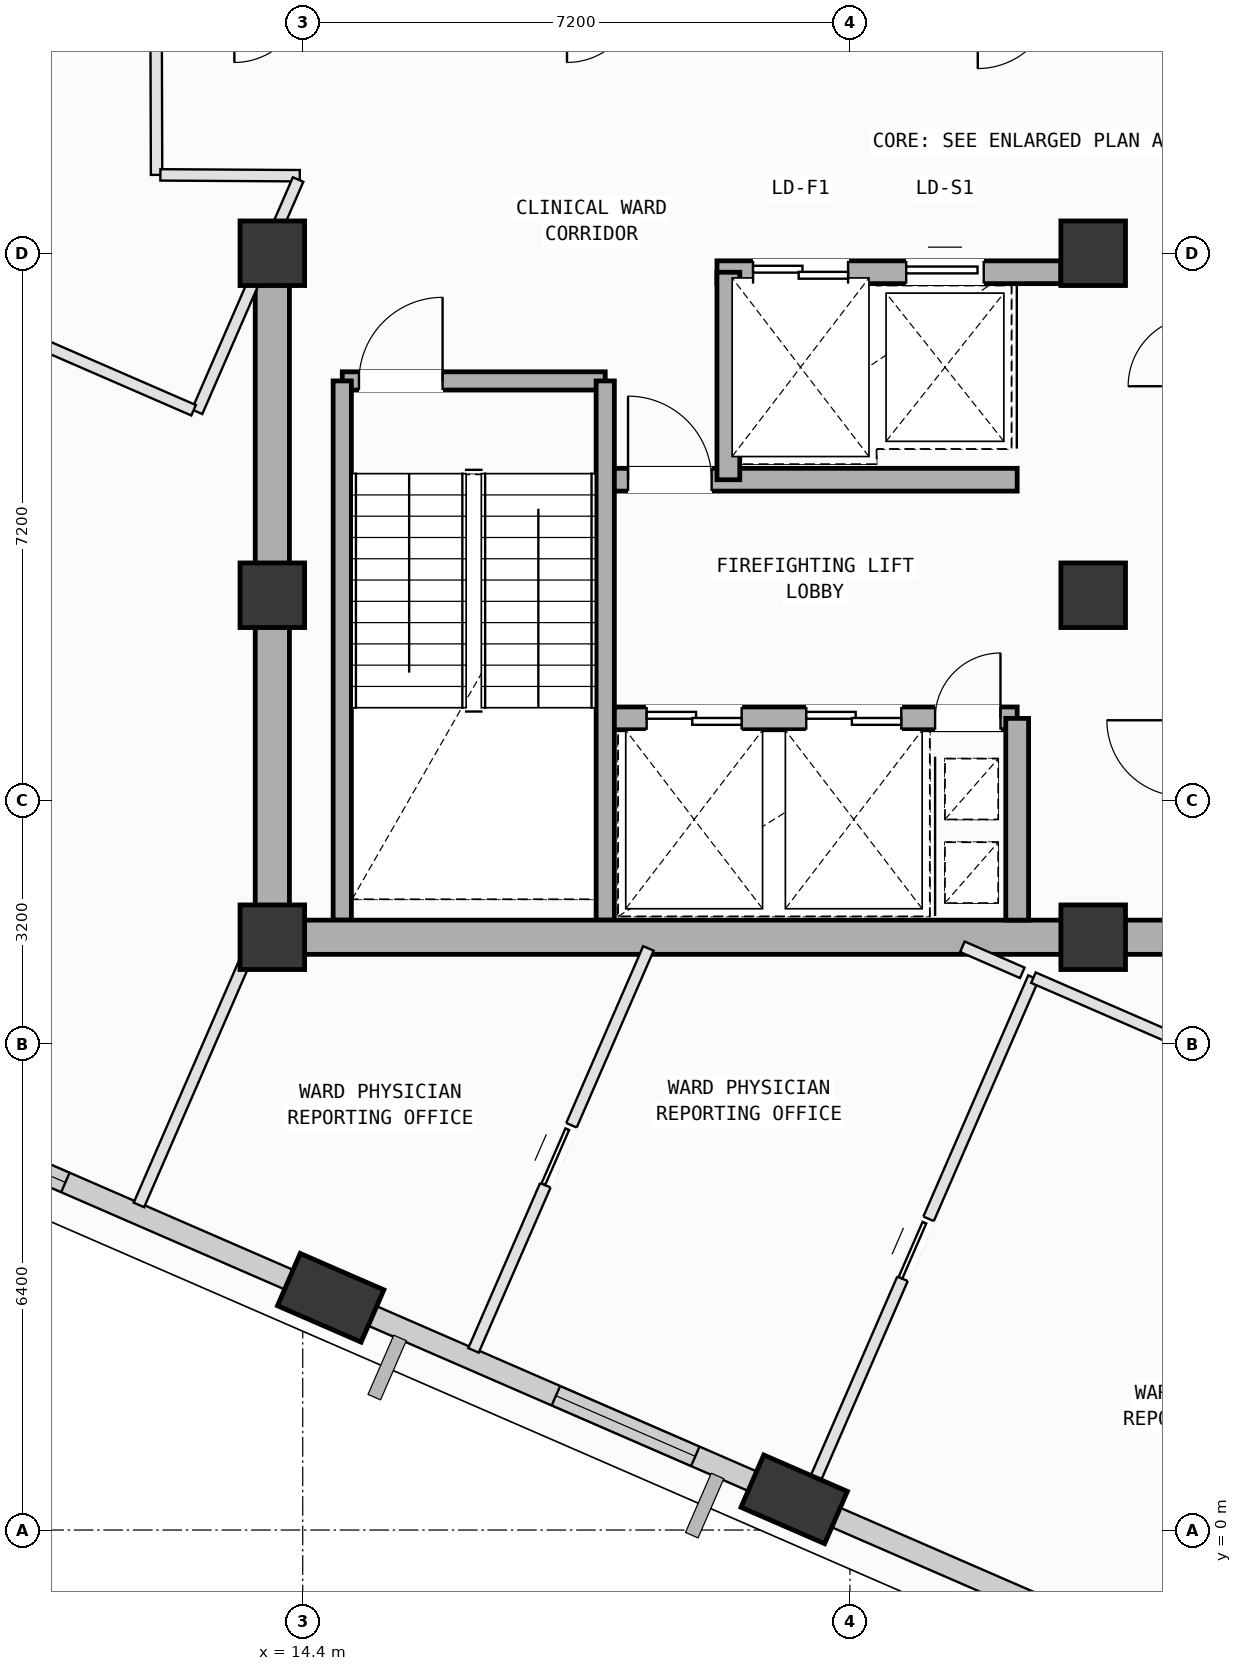
"""IFC4 building model, lengths in metres.
Left out: names, types, materials, properties, quantities, classifications, styles, units other than length and angle.
Written with IfcOpenShell. Run it as: python <this file> out.ifc"""

import sys

from ifc_helpers import new_model, si_unit, direction, frame, frame_2d, origin, origin_2d, place, context, subcontext, project, spatial, rectangle, extrude, element, fill, save


model = new_model("IFC4")
c1 = context("Model", 3, precision=1e-05, world=origin(), true_north=direction((0.0, 1.0)))
c2 = subcontext(c1, "Body", "Model", "MODEL_VIEW")
j1 = project(units=[si_unit("LENGTHUNIT", "METRE"), si_unit("PLANEANGLEUNIT", "RADIAN")], contexts=[c1])
p1 = place(None, origin())
s1 = spatial("IfcSite", under=j1, at=p1, CompositionType="ELEMENT")
p2 = place(p1, origin())
s2 = spatial("IfcBuilding", under=s1, at=p2, CompositionType="ELEMENT")
p3 = place(p2, frame((0.0, 0.0, 324.6)))
s3 = spatial("IfcBuildingStorey", under=s2, at=p3, CompositionType="ELEMENT", Elevation=324.6)
for number, where, z_axis, x_axis in (
    (1, (14.0, 7.8, 0.0), (0.0, 0.0, 1.0), (1.0, 0.0, 0.0)),
    (2, (14.0, 12.3, 0.0), (0.0, 0.0, 1.0), (1.0, 0.0, 0.0)),
    (3, (14.0, 16.8, 0.0), (0.0, 0.0, 1.0), (1.0, 0.0, 0.0)),
    (4, (24.8, 7.8, 0.0), (0.0, 0.0, 1.0), (1.0, 0.0, 0.0)),
    (5, (24.8, 12.3, 0.0), (0.0, 0.0, 1.0), (1.0, 0.0, 0.0)),
    (6, (24.8, 16.8, 0.0), (0.0, 0.0, 1.0), (1.0, 0.0, 0.0)),
):
    element("IfcColumn", number, at=place(p3, frame(where, z_axis=z_axis, x_axis=x_axis)), inside=s3, PredefinedType="COLUMN", context=c2, shape_type="SweptSolid", body=[
        extrude(rectangle(XDim=0.85, YDim=0.85, at=origin_2d()), origin(), (0.0, 0.0, 1.0), 4.0),
    ])
for number, where, z_axis, x_axis in (
    (7, (14.768, 3.056, 0.002), (0.0, 0.0, 1.0), (-0.917, 0.399, 0.0)),
    (8, (20.866, 0.404, 0.002), (0.0, 0.0, 1.0), (-0.917, 0.399, 0.0)),
):
    element("IfcColumn", number, at=place(p3, frame(where, z_axis=z_axis, x_axis=x_axis)), inside=s3, PredefinedType="COLUMN", context=c2, shape_type="SweptSolid", body=[
        extrude(rectangle(XDim=1.2, YDim=0.75, at=origin_2d()), origin(), (0.0, 0.0, 1.0), 3.996),
    ])
p4 = place(p3, frame((25.484, 21.187, 0.0), z_axis=(0.0, 0.0, 1.0), x_axis=(0.917060568388, -0.398747932794, 0.0)))
e9 = element("IfcWall", 9, at=p4, inside=s3, PredefinedType="SOLIDWALL", context=c2, shape_type="SweptSolid", body=[
    extrude(rectangle(XDim=6.955, YDim=0.28, at=frame_2d((3.478, 0.0))), origin(), (0.0, 0.0, 1.0), 2.765),
])
p5 = place(p3, frame((9.442, 18.018, 0.0), z_axis=(0.0, 0.0, 1.0), x_axis=(0.398768305896, 0.917051709672, 0.0)))
e10 = element("IfcWall", 10, at=p5, inside=s3, PredefinedType="SOLIDWALL", context=c2, shape_type="SweptSolid", body=[
    extrude(rectangle(XDim=7.405, YDim=0.28, at=frame_2d((3.703, 0.0))), origin(), (0.0, 0.0, 1.0), 3.265),
])
p6 = place(p3, frame((14.403, 3.215, 0.0), z_axis=(0.0, 0.0, 1.0), x_axis=(-0.917061363729, 0.398746103624, 0.0)))
e11 = element("IfcWall", 11, at=p6, inside=s3, PredefinedType="SOLIDWALL", context=c2, shape_type="SweptSolid", body=[
    extrude(rectangle(XDim=5.805, YDim=0.28, at=frame_2d((2.902, 0.0))), origin(), (0.0, 0.0, 1.0), 3.265),
])
p7 = place(p6, frame((3.409, 0.0, 0.75)))
e12 = element("IfcOpeningElement", 12, at=p7, cuts=e11, PredefinedType="OPENING", context=c2, shape_type="SweptSolid", body=[
    extrude(rectangle(XDim=1.6, YDim=1.95, at=frame_2d((0.8, 0.975))), frame((0.0, 0.15, 0.0), z_axis=(0.0, -1.0, 0.0), x_axis=(1.0, 0.0, 0.0)), (0.0, 0.0, 1.0), 0.3),
])
p8 = place(p3, frame((20.501, 0.563, 0.0), z_axis=(0.0, 0.0, 1.0), x_axis=(-0.917057460307, 0.39875508084, 0.0)))
e13 = element("IfcWall", 13, at=p8, inside=s3, PredefinedType="SOLIDWALL", context=c2, shape_type="SweptSolid", body=[
    extrude(rectangle(XDim=5.855, YDim=0.28, at=frame_2d((2.927, 0.0))), origin(), (0.0, 0.0, 1.0), 3.265),
])
p9 = place(p8, frame((1.021, 0.0, 0.75)))
e14 = element("IfcOpeningElement", 14, at=p9, cuts=e13, PredefinedType="OPENING", context=c2, shape_type="SweptSolid", body=[
    extrude(rectangle(XDim=2.0, YDim=1.95, at=frame_2d((1.0, 0.975))), frame((0.0, 0.15, 0.0), z_axis=(0.0, -1.0, 0.0), x_axis=(1.0, 0.0, 0.0)), (0.0, 0.0, 1.0), 0.3),
])
p10 = place(p3, frame((28.159, -2.767, 0.0), z_axis=(0.0, 0.0, 1.0), x_axis=(-0.917061321999, 0.398746199597, 0.0)))
e15 = element("IfcWall", 15, at=p10, inside=s3, PredefinedType="SOLIDWALL", context=c2, shape_type="SweptSolid", body=[
    extrude(rectangle(XDim=7.555, YDim=0.28, at=frame_2d((3.777, 0.0))), origin(), (0.0, 0.0, 1.0), 3.265),
])
p11 = place(p10, frame((0.47, 0.0, 0.75)))
e16 = element("IfcOpeningElement", 16, at=p11, cuts=e15, PredefinedType="OPENING", context=c2, shape_type="SweptSolid", body=[
    extrude(rectangle(XDim=1.4, YDim=1.85, at=frame_2d((0.7, 0.925))), frame((0.0, 0.15, 0.0), z_axis=(0.0, -1.0, 0.0), x_axis=(1.0, 0.0, 0.0)), (0.0, 0.0, 1.0), 0.3),
])
p12 = place(p3, frame((14.92, 15.12, 0.0), z_axis=(0.0, 0.0, 1.0), x_axis=(1.0, 0.0, 0.0)))
e17 = element("IfcWall", 17, at=p12, inside=s3, PredefinedType="SOLIDWALL", context=c2, shape_type="SweptSolid", body=[
    extrude(rectangle(XDim=3.46, YDim=0.24, at=frame_2d((1.73, 0.0))), origin(), (0.0, 0.0, 1.0), 3.78),
])
p13 = place(p12, frame((0.22, 0.0, 0.0)))
e18 = element("IfcOpeningElement", 18, at=p13, cuts=e17, PredefinedType="OPENING", context=c2, shape_type="SweptSolid", body=[
    extrude(rectangle(XDim=1.1, YDim=2.15, at=frame_2d((0.55, 1.075))), frame((0.0, 0.13, 0.0), z_axis=(0.0, -1.0, 0.0), x_axis=(1.0, 0.0, 0.0)), (0.0, 0.0, 1.0), 0.26),
])
for number, where, z_axis, x_axis in (
    (19, (18.38, 15.12, 0.0), (0.0, 0.0, 1.0), (0.0, -1.0, 0.0)),
    (20, (14.92, 8.025, 0.0), (0.0, 0.0, 1.0), (0.0, 1.0, 0.0)),
):
    element("IfcWall", number, at=place(p3, frame(where, z_axis=z_axis, x_axis=x_axis)), inside=s3, PredefinedType="SOLIDWALL", context=c2, shape_type="SweptSolid", body=[
        extrude(rectangle(XDim=7.095, YDim=0.24, at=frame_2d((3.548, 0.0))), origin(), (0.0, 0.0, 1.0), 3.78),
    ])
for number, where, z_axis, x_axis in (
    (21, (14.0, 7.8, 0.0), (0.0, 0.0, 1.0), (1.0, 0.0, 0.0)),
    (22, (24.8, 7.8, 0.0), (0.0, 0.0, 1.0), (1.0, 0.0, 0.0)),
):
    element("IfcWall", number, at=place(p3, frame(where, z_axis=z_axis, x_axis=x_axis)), inside=s3, PredefinedType="SHEAR", context=c2, shape_type="SweptSolid", body=[
        extrude(rectangle(XDim=10.8, YDim=0.45, at=frame_2d((5.4, 0.0))), origin(), (0.0, 0.0, 1.0), 3.78),
    ])
p14 = place(p3, frame((14.0, 16.8, 0.0), z_axis=(0.0, 0.0, 1.0), x_axis=(0.0, -1.0, 0.0)))
e23 = element("IfcWall", 23, at=p14, inside=s3, PredefinedType="SHEAR", context=c2, shape_type="SweptSolid", body=[
    extrude(rectangle(XDim=9.0, YDim=0.45, at=frame_2d((4.5, 0.0))), origin(), (0.0, 0.0, 1.0), 3.78),
])
p15 = place(p3, frame((19.85, 16.55, 0.0), z_axis=(0.0, 0.0, 1.0), x_axis=(1.0, 0.0, 0.0)))
e24 = element("IfcWall", 24, at=p15, inside=s3, PredefinedType="SOLIDWALL", context=c2, shape_type="SweptSolid", body=[
    extrude(rectangle(XDim=4.525, YDim=0.3, at=frame_2d((2.262, 0.0))), origin(), (0.0, 0.0, 1.0), 3.78),
])
p16 = place(p15, frame((0.475, 0.0, 0.0)))
e25 = element("IfcOpeningElement", 25, at=p16, cuts=e24, PredefinedType="OPENING", context=c2, shape_type="SweptSolid", body=[
    extrude(rectangle(XDim=1.25, YDim=2.18, at=frame_2d((0.625, 1.09))), frame((0.0, 0.16, 0.0), z_axis=(0.0, -1.0, 0.0), x_axis=(1.0, 0.0, 0.0)), (0.0, 0.0, 1.0), 0.32),
])
p17 = place(p15, frame((2.49, 0.0, 0.0)))
e26 = element("IfcOpeningElement", 26, at=p17, cuts=e24, PredefinedType="OPENING", context=c2, shape_type="SweptSolid", body=[
    extrude(rectangle(XDim=1.02, YDim=2.12, at=frame_2d((0.51, 1.06))), frame((0.0, 0.16, 0.0), z_axis=(0.0, -1.0, 0.0), x_axis=(1.0, 0.0, 0.0)), (0.0, 0.0, 1.0), 0.32),
])
p18 = place(p3, frame((18.5, 10.68, 0.0), z_axis=(0.0, 0.0, 1.0), x_axis=(1.0, 0.0, 0.0)))
e27 = element("IfcWall", 27, at=p18, inside=s3, PredefinedType="SOLIDWALL", context=c2, shape_type="SweptSolid", body=[
    extrude(rectangle(XDim=5.3, YDim=0.3, at=frame_2d((2.65, 0.0))), origin(), (0.0, 0.0, 1.0), 3.78),
])
p19 = place(p18, frame((4.22, 0.0, 0.0)))
e28 = element("IfcOpeningElement", 28, at=p19, cuts=e27, PredefinedType="OPENING", context=c2, shape_type="SweptSolid", body=[
    extrude(rectangle(XDim=0.86, YDim=2.06, at=frame_2d((0.43, 1.03))), frame((0.0, 0.16, 0.0), z_axis=(0.0, -1.0, 0.0), x_axis=(1.0, 0.0, 0.0)), (0.0, 0.0, 1.0), 0.32),
])
p20 = place(p18, frame((0.425, 0.0, 0.0)))
e29 = element("IfcOpeningElement", 29, at=p20, cuts=e27, PredefinedType="OPENING", context=c2, shape_type="SweptSolid", body=[
    extrude(rectangle(XDim=1.25, YDim=2.18, at=frame_2d((0.625, 1.09))), frame((0.0, 0.16, 0.0), z_axis=(0.0, -1.0, 0.0), x_axis=(1.0, 0.0, 0.0)), (0.0, 0.0, 1.0), 0.32),
])
p21 = place(p18, frame((2.525, 0.0, 0.0)))
e30 = element("IfcOpeningElement", 30, at=p21, cuts=e27, PredefinedType="OPENING", context=c2, shape_type="SweptSolid", body=[
    extrude(rectangle(XDim=1.25, YDim=2.18, at=frame_2d((0.625, 1.09))), frame((0.0, 0.16, 0.0), z_axis=(0.0, -1.0, 0.0), x_axis=(1.0, 0.0, 0.0)), (0.0, 0.0, 1.0), 0.32),
])
p22 = place(p3, frame((18.5, 13.82, 0.0), z_axis=(0.0, 0.0, 1.0), x_axis=(1.0, 0.0, 0.0)))
e31 = element("IfcWall", 31, at=p22, inside=s3, PredefinedType="SOLIDWALL", context=c2, shape_type="SweptSolid", body=[
    extrude(rectangle(XDim=5.3, YDim=0.3, at=frame_2d((2.65, 0.0))), origin(), (0.0, 0.0, 1.0), 3.78),
])
p23 = place(p22, frame((0.18, 0.0, 0.0)))
e32 = element("IfcOpeningElement", 32, at=p23, cuts=e31, PredefinedType="OPENING", context=c2, shape_type="SweptSolid", body=[
    extrude(rectangle(XDim=1.1, YDim=2.15, at=frame_2d((0.55, 1.075))), frame((0.0, 0.16, 0.0), z_axis=(0.0, -1.0, 0.0), x_axis=(1.0, 0.0, 0.0)), (0.0, 0.0, 1.0), 0.32),
])
p24 = place(p3, frame((23.8, 8.025, 0.0), z_axis=(0.0, 0.0, 1.0), x_axis=(0.0, 1.0, 0.0)))
e33 = element("IfcWall", 33, at=p24, inside=s3, PredefinedType="SOLIDWALL", context=c2, shape_type="SweptSolid", body=[
    extrude(rectangle(XDim=2.655, YDim=0.3, at=frame_2d((1.328, 0.0))), origin(), (0.0, 0.0, 1.0), 3.78),
])
p25 = place(p3, frame((20.0, 13.82, 0.0), z_axis=(0.0, 0.0, 1.0), x_axis=(0.0, 1.0, 0.0)))
e34 = element("IfcWall", 34, at=p25, inside=s3, PredefinedType="SOLIDWALL", context=c2, shape_type="SweptSolid", body=[
    extrude(rectangle(XDim=2.73, YDim=0.3, at=frame_2d((1.365, 0.0))), origin(), (0.0, 0.0, 1.0), 3.78),
])
p26 = place(p3, frame((20.912, 0.134, 0.0), z_axis=(0.0, 0.0, 1.0), x_axis=(0.398731849313, 0.917067561493, 0.0)))
e35 = element("IfcWall", 35, at=p26, inside=s3, PredefinedType="PARTITIONING", context=c2, shape_type="SweptSolid", body=[
    extrude(rectangle(XDim=7.779, YDim=0.15, at=frame_2d((3.89, 0.0))), origin(), (0.0, 0.0, 1.0), 2.765),
])
p27 = place(p26, frame((3.46, 0.0, 0.0)))
e36 = element("IfcOpeningElement", 36, at=p27, cuts=e35, PredefinedType="OPENING", context=c2, shape_type="SweptSolid", body=[
    extrude(rectangle(XDim=0.86, YDim=2.06, at=frame_2d((0.43, 1.03))), frame((0.0, 0.085, 0.0), z_axis=(0.0, -1.0, 0.0), x_axis=(1.0, 0.0, 0.0)), (0.0, 0.0, 1.0), 0.17),
])
p28 = place(p3, frame((24.014, 7.268, 0.0), z_axis=(0.0, 0.0, 1.0), x_axis=(0.91706671013, -0.398733807411, 0.0)))
e37 = element("IfcWall", 37, at=p28, inside=s3, PredefinedType="PARTITIONING", context=c2, shape_type="SweptSolid", body=[
    extrude(rectangle(XDim=4.64, YDim=0.15, at=frame_2d((2.32, 0.0))), origin(), (0.0, 0.0, 1.0), 3.78),
])
p29 = place(p28, frame((1.89, 0.0, 0.0)))
e38 = element("IfcOpeningElement", 38, at=p29, cuts=e37, PredefinedType="OPENING", context=c2, shape_type="SweptSolid", body=[
    extrude(rectangle(XDim=0.86, YDim=2.06, at=frame_2d((0.43, 1.03))), frame((0.0, 0.085, 0.0), z_axis=(0.0, -1.0, 0.0), x_axis=(1.0, 0.0, 0.0)), (0.0, 0.0, 1.0), 0.17),
])
p30 = place(p3, frame((16.647, 2.364, 0.0), z_axis=(0.0, 0.0, 1.0), x_axis=(0.398935045973, 0.916979186838, 0.0)))
e39 = element("IfcWall", 39, at=p30, inside=s3, PredefinedType="PARTITIONING", context=c2, shape_type="SweptSolid", body=[
    extrude(rectangle(XDim=5.768, YDim=0.15, at=frame_2d((2.884, 0.0))), origin(), (0.0, 0.0, 1.0), 3.78),
])
p31 = place(p30, frame((2.37, 0.0, 0.0)))
e40 = element("IfcOpeningElement", 40, at=p31, cuts=e39, PredefinedType="OPENING", context=c2, shape_type="SweptSolid", body=[
    extrude(rectangle(XDim=0.86, YDim=2.06, at=frame_2d((0.43, 1.03))), frame((0.0, 0.085, 0.0), z_axis=(0.0, -1.0, 0.0), x_axis=(1.0, 0.0, 0.0)), (0.0, 0.0, 1.0), 0.17),
])
p32 = place(p3, frame((23.079, 7.675, 0.0), z_axis=(0.0, 0.0, 1.0), x_axis=(0.91686666905, -0.399193576082, 0.0)))
e41 = element("IfcWall", 41, at=p32, inside=s3, PredefinedType="PARTITIONING", context=c2, shape_type="SweptSolid", body=[
    extrude(rectangle(XDim=0.859, YDim=0.15, at=frame_2d((0.43, 0.0))), origin(), (0.0, 0.0, 1.0), 3.78),
])
p33 = place(p3, frame((15.04, 2.686, 0.0), z_axis=(0.0, 0.0, 1.0), x_axis=(-0.916649826418, 0.399691250501, 0.0)))
e42 = element("IfcWall", 42, at=p33, inside=s3, PredefinedType="PARTITIONING", context=c2, shape_type="SweptSolid", body=[
    extrude(rectangle(XDim=0.795, YDim=0.15, at=frame_2d((0.398, 0.0))), origin(), (0.0, 0.0, 1.0), 3.265),
])
p34 = place(p3, frame((12.245, 4.278, 0.0), z_axis=(0.0, 0.0, 1.0), x_axis=(0.398841135758, 0.917020037091, 0.0)))
e43 = element("IfcWall", 43, at=p34, inside=s3, PredefinedType="PARTITIONING", context=c2, shape_type="SweptSolid", body=[
    extrude(rectangle(XDim=3.648, YDim=0.15, at=frame_2d((1.824, 0.0))), origin(), (0.0, 0.0, 1.0), 3.78),
])
p35 = place(p3, frame((12.47, 20.203, 0.0), z_axis=(0.0, 0.0, 1.0), x_axis=(0.002985061327, -0.999995544695, 0.0)))
e44 = element("IfcWall", 44, at=p35, inside=s3, PredefinedType="PARTITIONING", context=c2, shape_type="SweptSolid", body=[
    extrude(rectangle(XDim=2.372, YDim=0.15, at=frame_2d((1.186, 0.0))), origin(), (0.0, 0.0, 1.0), 3.78),
])
p36 = place(p3, frame((12.527, 17.831, 0.0), z_axis=(0.0, 0.0, 1.0), x_axis=(0.999982057945, -0.005990307855, 0.0)))
e45 = element("IfcWall", 45, at=p36, inside=s3, PredefinedType="PARTITIONING", context=c2, shape_type="SweptSolid", body=[
    extrude(rectangle(XDim=1.834, YDim=0.15, at=frame_2d((0.917, 0.0))), origin(), (0.0, 0.0, 1.0), 3.78),
])
p37 = place(p3, frame((14.339, 17.77, 0.0), z_axis=(0.0, 0.0, 1.0), x_axis=(-0.399140640041, -0.916889714997, 0.0)))
e46 = element("IfcWall", 46, at=p37, inside=s3, PredefinedType="PARTITIONING", context=c2, shape_type="SweptSolid", body=[
    extrude(rectangle(XDim=0.84, YDim=0.15, at=frame_2d((0.42, 0.0))), origin(), (0.0, 0.0, 1.0), 2.765),
])
p38 = place(p3, frame((13.8, 16.53, 0.0), z_axis=(0.0, 0.0, 1.0), x_axis=(-0.398942481852, -0.916975951797, 0.0)))
e47 = element("IfcWall", 47, at=p38, inside=s3, PredefinedType="PARTITIONING", context=c2, shape_type="SweptSolid", body=[
    extrude(rectangle(XDim=1.98, YDim=0.15, at=frame_2d((0.99, 0.0))), origin(), (0.0, 0.0, 1.0), 2.765),
])
p39 = place(p3, frame((12.964, 14.734, 0.0), z_axis=(0.0, 0.0, 1.0), x_axis=(-0.917054263497, 0.398762432786, 0.0)))
e48 = element("IfcWall", 48, at=p39, inside=s3, PredefinedType="PARTITIONING", context=c2, shape_type="SweptSolid", body=[
    extrude(rectangle(XDim=4.424, YDim=0.15, at=frame_2d((2.212, 0.0))), origin(), (0.0, 0.0, 1.0), 3.78),
])
p40 = place(p7, origin())
e49 = element("IfcWindow", 49, at=p40, inside=s3, PartitioningType="SINGLE_PANEL", PredefinedType="WINDOW", context=c2, shape_type="SweptSolid", body=[
    extrude(rectangle(XDim=1.6, YDim=1.95, at=frame_2d((0.8, 0.975))), frame((0.0, 0.03, 0.0), z_axis=(0.0, -1.0, 0.0), x_axis=(1.0, 0.0, 0.0)), (0.0, 0.0, 1.0), 0.06),
])
fill(e12, e49)
p41 = place(p9, origin())
e50 = element("IfcWindow", 50, at=p41, inside=s3, PartitioningType="SINGLE_PANEL", PredefinedType="WINDOW", context=c2, shape_type="SweptSolid", body=[
    extrude(rectangle(XDim=2.0, YDim=1.95, at=frame_2d((1.0, 0.975))), frame((0.0, 0.03, 0.0), z_axis=(0.0, -1.0, 0.0), x_axis=(1.0, 0.0, 0.0)), (0.0, 0.0, 1.0), 0.06),
])
fill(e14, e50)
p42 = place(p13, origin())
e51 = element("IfcDoor", 51, at=p42, inside=s3, OperationType="SINGLE_SWING_RIGHT", PredefinedType="DOOR", context=c2, shape_type="SweptSolid", body=[
    extrude(rectangle(XDim=1.1, YDim=2.15, at=frame_2d((0.55, 1.075))), frame((0.0, 0.025, 0.0), z_axis=(0.0, -1.0, 0.0), x_axis=(1.0, 0.0, 0.0)), (0.0, 0.0, 1.0), 0.05),
])
fill(e18, e51)
p43 = place(p19, origin())
e52 = element("IfcDoor", 52, at=p43, inside=s3, OperationType="SINGLE_SWING_RIGHT", PredefinedType="DOOR", context=c2, shape_type="SweptSolid", body=[
    extrude(rectangle(XDim=0.86, YDim=2.06, at=frame_2d((0.43, 1.03))), frame((0.0, 0.025, 0.0), z_axis=(0.0, -1.0, 0.0), x_axis=(1.0, 0.0, 0.0)), (0.0, 0.0, 1.0), 0.05),
])
fill(e28, e52)
p44 = place(p23, origin())
e53 = element("IfcDoor", 53, at=p44, inside=s3, OperationType="SINGLE_SWING_LEFT", PredefinedType="DOOR", context=c2, shape_type="SweptSolid", body=[
    extrude(rectangle(XDim=1.1, YDim=2.15, at=frame_2d((0.55, 1.075))), frame((0.0, 0.025, 0.0), z_axis=(0.0, -1.0, 0.0), x_axis=(1.0, 0.0, 0.0)), (0.0, 0.0, 1.0), 0.05),
])
fill(e32, e53)
p45 = place(p20, origin())
e54 = element("IfcDoor", 54, at=p45, inside=s3, OperationType="DOUBLE_DOOR_SLIDING", PredefinedType="DOOR", context=c2, shape_type="SweptSolid", body=[
    extrude(rectangle(XDim=1.25, YDim=2.18, at=frame_2d((0.625, 1.09))), frame((0.0, 0.025, 0.0), z_axis=(0.0, -1.0, 0.0), x_axis=(1.0, 0.0, 0.0)), (0.0, 0.0, 1.0), 0.05),
])
fill(e29, e54)
p46 = place(p21, origin())
e55 = element("IfcDoor", 55, at=p46, inside=s3, OperationType="DOUBLE_DOOR_SLIDING", PredefinedType="DOOR", context=c2, shape_type="SweptSolid", body=[
    extrude(rectangle(XDim=1.25, YDim=2.18, at=frame_2d((0.625, 1.09))), frame((0.0, 0.025, 0.0), z_axis=(0.0, -1.0, 0.0), x_axis=(1.0, 0.0, 0.0)), (0.0, 0.0, 1.0), 0.05),
])
fill(e30, e55)
p47 = place(p16, origin())
e56 = element("IfcDoor", 56, at=p47, inside=s3, OperationType="DOUBLE_DOOR_SLIDING", PredefinedType="DOOR", context=c2, shape_type="SweptSolid", body=[
    extrude(rectangle(XDim=1.25, YDim=2.18, at=frame_2d((0.625, 1.09))), frame((0.0, 0.025, 0.0), z_axis=(0.0, -1.0, 0.0), x_axis=(1.0, 0.0, 0.0)), (0.0, 0.0, 1.0), 0.05),
])
fill(e25, e56)
p48 = place(p17, origin())
e57 = element("IfcDoor", 57, at=p48, inside=s3, OperationType="SLIDING_TO_LEFT", PredefinedType="DOOR", context=c2, shape_type="SweptSolid", body=[
    extrude(rectangle(XDim=1.02, YDim=2.12, at=frame_2d((0.51, 1.06))), frame((0.0, 0.025, 0.0), z_axis=(0.0, -1.0, 0.0), x_axis=(1.0, 0.0, 0.0)), (0.0, 0.0, 1.0), 0.05),
])
fill(e26, e57)
p49 = place(p27, origin())
e58 = element("IfcDoor", 58, at=p49, inside=s3, OperationType="SLIDING_TO_LEFT", PredefinedType="DOOR", context=c2, shape_type="SweptSolid", body=[
    extrude(rectangle(XDim=0.86, YDim=2.06, at=frame_2d((0.43, 1.03))), frame((0.0, 0.025, 0.0), z_axis=(0.0, -1.0, 0.0), x_axis=(1.0, 0.0, 0.0)), (0.0, 0.0, 1.0), 0.05),
])
fill(e36, e58)
p50 = place(p31, origin())
e59 = element("IfcDoor", 59, at=p50, inside=s3, OperationType="SLIDING_TO_LEFT", PredefinedType="DOOR", context=c2, shape_type="SweptSolid", body=[
    extrude(rectangle(XDim=0.86, YDim=2.06, at=frame_2d((0.43, 1.03))), frame((0.0, 0.025, 0.0), z_axis=(0.0, -1.0, 0.0), x_axis=(1.0, 0.0, 0.0)), (0.0, 0.0, 1.0), 0.05),
])
fill(e40, e59)
save(model, sys.argv[1])
